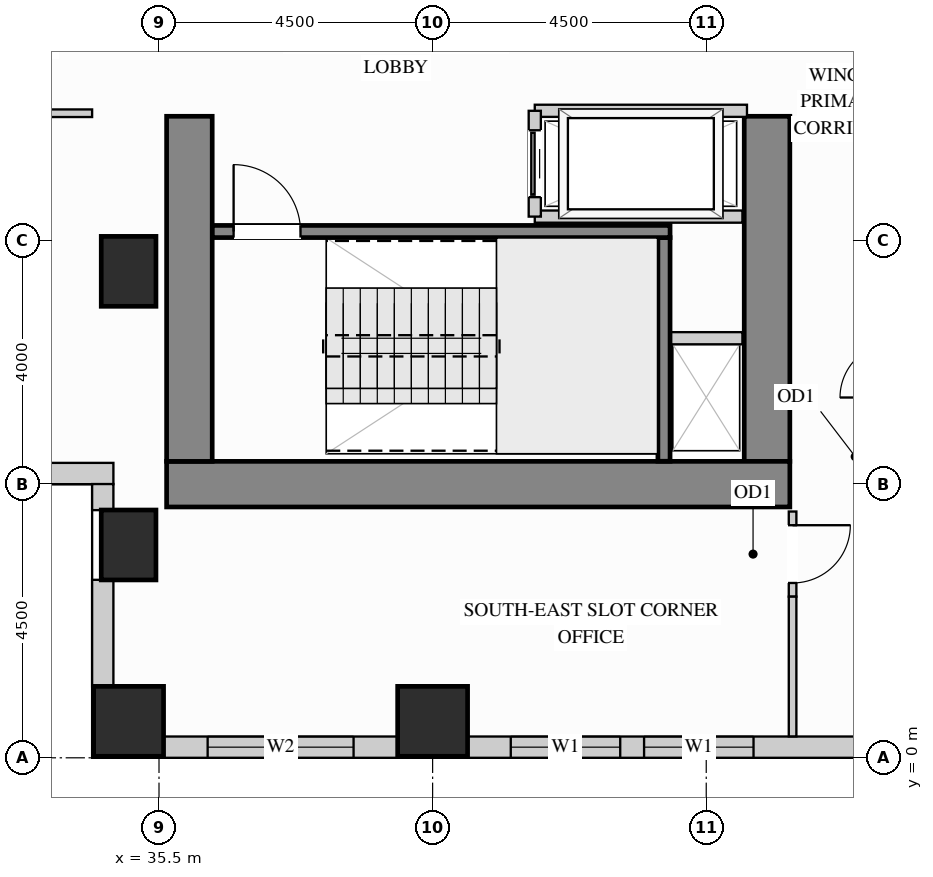
"""IFC4 building model, lengths in metres.
Left out: names, types, materials, properties, quantities, classifications, styles, units other than length and angle.
Written with IfcOpenShell. Run it as: python <this file> out.ifc"""

import sys

from ifc_helpers import new_model, si_unit, direction, frame, frame_2d, origin, origin_2d, place, context, subcontext, project, spatial, rectangle, extrude, source, transform, mapped, element, fill, save


model = new_model("IFC4")
c1 = context("Model", 3, precision=1e-05, world=origin(), true_north=direction((0.0, 1.0)))
c2 = subcontext(c1, "Body", "Model", "MODEL_VIEW")
j1 = project(units=[si_unit("LENGTHUNIT", "METRE"), si_unit("PLANEANGLEUNIT", "RADIAN")], contexts=[c1])
p1 = place(None, origin())
s1 = spatial("IfcSite", under=j1, at=p1, CompositionType="ELEMENT")
p2 = place(p1, origin())
s2 = spatial("IfcBuilding", under=s1, at=p2, CompositionType="ELEMENT")
p3 = place(p2, frame((0.0, 0.0, 77.4)))
s3 = spatial("IfcBuildingStorey", under=s2, at=p3, CompositionType="ELEMENT", Elevation=77.4)
m1 = source(origin(), c2, "Body", "SweptSolid", [
    extrude(rectangle(XDim=0.9, YDim=1.15, at=origin_2d()), origin(), (0.0, 0.0, 1.0), 3.38),
])
for number, where, z_axis, x_axis in (
    (1, (35.0, 3.5, 0.0), (0.0, 0.0, 1.0), (1.0, 0.0, 0.0)),
    (2, (35.0, 8.0, 0.0), (0.0, 0.0, 1.0), (1.0, 0.0, 0.0)),
):
    element("IfcColumn", number, at=place(p3, frame(where, z_axis=z_axis, x_axis=x_axis)), inside=s3, PredefinedType="COLUMN", context=c2, shape_type="MappedRepresentation", body=[
        mapped(m1, transform((0.0, 0.0, 0.0), x_axis=(1.0, 0.0, 0.0), y_axis=(0.0, 1.0, 0.0), z_axis=(0.0, 0.0, 1.0))),
    ])
m2 = source(origin(), c2, "Body", "SweptSolid", [
    extrude(rectangle(XDim=1.15, YDim=1.15, at=origin_2d()), origin(), (0.0, 0.0, 1.0), 3.38),
])
for number, where, z_axis, x_axis in (
    (3, (35.0, 0.6, 0.0), (0.0, 0.0, 1.0), (1.0, 0.0, 0.0)),
    (4, (40.0, 0.6, 0.0), (0.0, 0.0, 1.0), (1.0, 0.0, 0.0)),
):
    element("IfcColumn", number, at=place(p3, frame(where, z_axis=z_axis, x_axis=x_axis)), inside=s3, PredefinedType="COLUMN", context=c2, shape_type="MappedRepresentation", body=[
        mapped(m2, transform((0.0, 0.0, 0.0), x_axis=(1.0, 0.0, 0.0), y_axis=(0.0, 1.0, 0.0), z_axis=(0.0, 0.0, 1.0))),
    ])
m3 = source(origin(), c2, "Body", "SweptSolid", [
    extrude(rectangle(XDim=5.675, YDim=0.75, at=frame_2d((2.837, 0.0))), origin(), (0.0, 0.0, 1.0), 3.38),
])
p4 = place(p3, frame((45.5, 4.875, 0.0), z_axis=(0.0, 0.0, 1.0), x_axis=(0.0, 1.0, 0.0)))
e5 = element("IfcWall", 5, at=p4, inside=s3, PredefinedType="SHEAR", context=c2, shape_type="MappedRepresentation", body=[
    mapped(m3, transform((0.0, 0.0, 0.0), x_axis=(1.0, 0.0, 0.0), y_axis=(0.0, 1.0, 0.0), z_axis=(0.0, 0.0, 1.0))),
])
m4 = source(origin(), c2, "Body", "SweptSolid", [
    extrude(rectangle(XDim=10.25, YDim=0.75, at=frame_2d((5.125, 0.0))), origin(), (0.0, 0.0, 1.0), 3.38),
])
p5 = place(p3, frame((35.625, 4.5, 0.0), z_axis=(0.0, 0.0, 1.0), x_axis=(1.0, 0.0, 0.0)))
e6 = element("IfcWall", 6, at=p5, inside=s3, PredefinedType="SHEAR", context=c2, shape_type="MappedRepresentation", body=[
    mapped(m4, transform((0.0, 0.0, 0.0), x_axis=(1.0, 0.0, 0.0), y_axis=(0.0, 1.0, 0.0), z_axis=(0.0, 0.0, 1.0))),
])
p6 = place(p3, frame((36.0, 4.875, 0.0), z_axis=(0.0, 0.0, 1.0), x_axis=(0.0, 1.0, 0.0)))
e7 = element("IfcWall", 7, at=p6, inside=s3, PredefinedType="SHEAR", context=c2, shape_type="MappedRepresentation", body=[
    mapped(m3, transform((0.0, 0.0, 0.0), x_axis=(1.0, 0.0, 0.0), y_axis=(0.0, 1.0, 0.0), z_axis=(0.0, 0.0, 1.0))),
])
p7 = place(p3, frame((19.15, 4.675, 0.0), z_axis=(0.0, 0.0, 1.0), x_axis=(1.0, 0.0, 0.0)))
e8 = element("IfcWall", 8, at=p7, inside=s3, PredefinedType="SOLIDWALL", context=c2, shape_type="SweptSolid", body=[
    extrude(rectangle(XDim=15.6, YDim=0.35, at=frame_2d((7.8, 0.0))), origin(), (0.0, 0.0, 1.0), 3.365),
])
p8 = place(p7, frame((1.73, 0.0, 0.78)))
e9 = element("IfcOpeningElement", 9, at=p8, cuts=e8, PredefinedType="OPENING", context=c2, shape_type="SweptSolid", body=[
    extrude(rectangle(XDim=1.5, YDim=2.0, at=frame_2d((0.75, 1.0))), frame((0.0, 0.185, 0.0), z_axis=(0.0, -1.0, 0.0), x_axis=(1.0, 0.0, 0.0)), (0.0, 0.0, 1.0), 0.37),
])
p9 = place(p7, frame((4.64, 0.0, 0.78)))
e10 = element("IfcOpeningElement", 10, at=p9, cuts=e8, PredefinedType="OPENING", context=c2, shape_type="SweptSolid", body=[
    extrude(rectangle(XDim=1.5, YDim=2.0, at=frame_2d((0.75, 1.0))), frame((0.0, 0.185, 0.0), z_axis=(0.0, -1.0, 0.0), x_axis=(1.0, 0.0, 0.0)), (0.0, 0.0, 1.0), 0.37),
])
p10 = place(p7, frame((9.46, 0.0, 0.78)))
e11 = element("IfcOpeningElement", 11, at=p10, cuts=e8, PredefinedType="OPENING", context=c2, shape_type="SweptSolid", body=[
    extrude(rectangle(XDim=1.5, YDim=2.0, at=frame_2d((0.75, 1.0))), frame((0.0, 0.185, 0.0), z_axis=(0.0, -1.0, 0.0), x_axis=(1.0, 0.0, 0.0)), (0.0, 0.0, 1.0), 0.37),
])
p11 = place(p7, frame((12.37, 0.0, 0.78)))
e12 = element("IfcOpeningElement", 12, at=p11, cuts=e8, PredefinedType="OPENING", context=c2, shape_type="SweptSolid", body=[
    extrude(rectangle(XDim=1.5, YDim=2.0, at=frame_2d((0.75, 1.0))), frame((0.0, 0.185, 0.0), z_axis=(0.0, -1.0, 0.0), x_axis=(1.0, 0.0, 0.0)), (0.0, 0.0, 1.0), 0.37),
])
m5 = source(origin(), c2, "Body", "SweptSolid", [
    extrude(rectangle(XDim=0.429, YDim=0.35, at=frame_2d((0.214, 0.0))), origin(), (0.0, 0.0, 1.0), 3.365),
])
p12 = place(p3, frame((34.575, 4.502, 0.0), z_axis=(0.0, 0.0, 1.0), x_axis=(0.0, -1.0, 0.0)))
e13 = element("IfcWall", 13, at=p12, inside=s3, PredefinedType="SOLIDWALL", context=c2, shape_type="MappedRepresentation", body=[
    mapped(m5, transform((0.0, 0.0, 0.0), x_axis=(1.0, 0.0, 0.0), y_axis=(0.0, 1.0, 0.0), z_axis=(0.0, 0.0, 1.0))),
])
m6 = source(origin(), c2, "Body", "SweptSolid", [
    extrude(rectangle(XDim=1.754, YDim=0.35, at=frame_2d((0.877, 0.0))), origin(), (0.0, 0.0, 1.0), 3.365),
])
p13 = place(p3, frame((34.575, 2.927, 0.0), z_axis=(0.0, 0.0, 1.0), x_axis=(0.0, -1.0, 0.0)))
e14 = element("IfcWall", 14, at=p13, inside=s3, PredefinedType="SOLIDWALL", context=c2, shape_type="MappedRepresentation", body=[
    mapped(m6, transform((0.0, 0.0, 0.0), x_axis=(1.0, 0.0, 0.0), y_axis=(0.0, 1.0, 0.0), z_axis=(0.0, 0.0, 1.0))),
])
p14 = place(p3, frame((35.573, 0.175, 0.0), z_axis=(0.0, 0.0, 1.0), x_axis=(1.0, 0.0, 0.0)))
e15 = element("IfcWall", 15, at=p14, inside=s3, PredefinedType="SOLIDWALL", context=c2, shape_type="SweptSolid", body=[
    extrude(rectangle(XDim=3.854, YDim=0.35, at=frame_2d((1.927, 0.0))), origin(), (0.0, 0.0, 1.0), 3.365),
])
p15 = place(p14, frame((0.727, 0.0, 0.78)))
e16 = element("IfcOpeningElement", 16, at=p15, cuts=e15, PredefinedType="OPENING", context=c2, shape_type="SweptSolid", body=[
    extrude(rectangle(XDim=2.4, YDim=2.1, at=frame_2d((1.2, 1.05))), frame((0.0, 0.185, 0.0), z_axis=(0.0, -1.0, 0.0), x_axis=(1.0, 0.0, 0.0)), (0.0, 0.0, 1.0), 0.37),
])
p16 = place(p3, frame((40.573, 0.175, 0.0), z_axis=(0.0, 0.0, 1.0), x_axis=(1.0, 0.0, 0.0)))
e17 = element("IfcWall", 17, at=p16, inside=s3, PredefinedType="SOLIDWALL", context=c2, shape_type="SweptSolid", body=[
    extrude(rectangle(XDim=6.454, YDim=0.35, at=frame_2d((3.227, 0.0))), origin(), (0.0, 0.0, 1.0), 3.365),
])
p17 = place(p16, frame((0.712, 0.0, 0.78)))
e18 = element("IfcOpeningElement", 18, at=p17, cuts=e17, PredefinedType="OPENING", context=c2, shape_type="SweptSolid", body=[
    extrude(rectangle(XDim=1.8, YDim=2.1, at=frame_2d((0.9, 1.05))), frame((0.0, 0.185, 0.0), z_axis=(0.0, -1.0, 0.0), x_axis=(1.0, 0.0, 0.0)), (0.0, 0.0, 1.0), 0.37),
])
p18 = place(p16, frame((2.905, 0.0, 0.78)))
e19 = element("IfcOpeningElement", 19, at=p18, cuts=e17, PredefinedType="OPENING", context=c2, shape_type="SweptSolid", body=[
    extrude(rectangle(XDim=1.8, YDim=2.1, at=frame_2d((0.9, 1.05))), frame((0.0, 0.185, 0.0), z_axis=(0.0, -1.0, 0.0), x_axis=(1.0, 0.0, 0.0)), (0.0, 0.0, 1.0), 0.37),
])
p19 = place(p3, frame((45.92, 2.65, 0.0), z_axis=(0.0, 0.0, 1.0), x_axis=(0.0, 1.0, 0.0)))
e20 = element("IfcWall", 20, at=p19, inside=s3, PredefinedType="PARTITIONING", context=c2, shape_type="SweptSolid", body=[
    extrude(rectangle(XDim=1.4, YDim=0.125, at=frame_2d((0.7, 0.0))), origin(), (0.0, 0.0, 1.0), 3.365),
])
p20 = place(p19, frame((0.225, 0.0, 0.0)))
e21 = element("IfcOpeningElement", 21, at=p20, cuts=e20, PredefinedType="OPENING", context=c2, shape_type="SweptSolid", body=[
    extrude(rectangle(XDim=0.95, YDim=2.15, at=frame_2d((0.475, 1.075))), frame((0.0, 0.073, 0.0), z_axis=(0.0, -1.0, 0.0), x_axis=(1.0, 0.0, 0.0)), (0.0, 0.0, 1.0), 0.145),
])
m7 = source(origin(), c2, "Body", "SweptSolid", [
    extrude(rectangle(XDim=2.298, YDim=0.125, at=frame_2d((1.149, 0.0))), origin(), (0.0, 0.0, 1.0), 3.365),
])
p21 = place(p3, frame((45.92, 0.352, 0.0), z_axis=(0.0, 0.0, 1.0), x_axis=(0.0, 1.0, 0.0)))
e22 = element("IfcWall", 22, at=p21, inside=s3, PredefinedType="PARTITIONING", context=c2, shape_type="MappedRepresentation", body=[
    mapped(m7, transform((0.0, 0.0, 0.0), x_axis=(1.0, 0.0, 0.0), y_axis=(0.0, 1.0, 0.0), z_axis=(0.0, 0.0, 1.0))),
])
p22 = place(p3, frame((26.95, 10.6, 0.0), z_axis=(0.0, 0.0, 1.0), x_axis=(1.0, 0.0, 0.0)))
e23 = element("IfcWall", 23, at=p22, inside=s3, PredefinedType="PARTITIONING", context=c2, shape_type="SweptSolid", body=[
    extrude(rectangle(XDim=7.45, YDim=0.125, at=frame_2d((3.725, 0.0))), origin(), (0.0, 0.0, 1.0), 3.365),
])
p23 = place(p22, frame((4.683, 0.0, 0.0)))
e24 = element("IfcOpeningElement", 24, at=p23, cuts=e23, PredefinedType="OPENING", context=c2, shape_type="SweptSolid", body=[
    extrude(rectangle(XDim=0.95, YDim=2.15, at=frame_2d((0.475, 1.075))), frame((0.0, 0.073, 0.0), z_axis=(0.0, -1.0, 0.0), x_axis=(1.0, 0.0, 0.0)), (0.0, 0.0, 1.0), 0.145),
])
m8 = source(origin(), c2, "Body", "SweptSolid", [
    extrude(rectangle(XDim=1.245, YDim=0.2, at=frame_2d((0.623, 0.0))), origin(), (0.0, 0.0, 1.0), 3.365),
])
p24 = place(p3, frame((43.85, 6.9, 0.0), z_axis=(0.0, 0.0, 1.0), x_axis=(1.0, 0.0, 0.0)))
e25 = element("IfcWall", 25, at=p24, inside=s3, PredefinedType="PARTITIONING", context=c2, shape_type="MappedRepresentation", body=[
    mapped(m8, transform((0.0, 0.0, 0.0), x_axis=(1.0, 0.0, 0.0), y_axis=(0.0, 1.0, 0.0), z_axis=(0.0, 0.0, 1.0))),
])
m9 = source(origin(), c2, "Body", "SweptSolid", [
    extrude(rectangle(XDim=3.49, YDim=0.2, at=frame_2d((1.745, 0.0))), origin(), (0.0, 0.0, 1.0), 3.365),
])
p25 = place(p3, frame((41.68, 10.64, 0.0), z_axis=(0.0, 0.0, 1.0), x_axis=(1.0, 0.0, 0.0)))
e26 = element("IfcWall", 26, at=p25, inside=s3, PredefinedType="PARTITIONING", context=c2, shape_type="MappedRepresentation", body=[
    mapped(m9, transform((0.0, 0.0, 0.0), x_axis=(1.0, 0.0, 0.0), y_axis=(0.0, 1.0, 0.0), z_axis=(0.0, 0.0, 1.0))),
])
m10 = source(origin(), c2, "Body", "SweptSolid", [
    extrude(rectangle(XDim=3.415, YDim=0.2, at=frame_2d((1.708, 0.0))), origin(), (0.0, 0.0, 1.0), 3.365),
])
p26 = place(p3, frame((41.68, 8.9, 0.0), z_axis=(0.0, 0.0, 1.0), x_axis=(1.0, 0.0, 0.0)))
e27 = element("IfcWall", 27, at=p26, inside=s3, PredefinedType="PARTITIONING", context=c2, shape_type="MappedRepresentation", body=[
    mapped(m10, transform((0.0, 0.0, 0.0), x_axis=(1.0, 0.0, 0.0), y_axis=(0.0, 1.0, 0.0), z_axis=(0.0, 0.0, 1.0))),
])
p27 = place(p3, frame((41.68, 8.9, 0.0), z_axis=(0.0, 0.0, 1.0), x_axis=(0.0, 1.0, 0.0)))
e28 = element("IfcWall", 28, at=p27, inside=s3, PredefinedType="PARTITIONING", context=c2, shape_type="SweptSolid", body=[
    extrude(rectangle(XDim=1.74, YDim=0.2, at=frame_2d((0.87, 0.0))), origin(), (0.0, 0.0, 1.0), 3.365),
])
p28 = place(p27, frame((0.32, 0.0, 0.0)))
e29 = element("IfcOpeningElement", 29, at=p28, cuts=e28, PredefinedType="OPENING", context=c2, shape_type="SweptSolid", body=[
    extrude(rectangle(XDim=1.1, YDim=2.2, at=frame_2d((0.55, 1.1))), frame((0.0, 0.11, 0.0), z_axis=(0.0, -1.0, 0.0), x_axis=(1.0, 0.0, 0.0)), (0.0, 0.0, 1.0), 0.22),
])
m11 = source(origin(), c2, "Body", "SweptSolid", [
    extrude(rectangle(XDim=3.678, YDim=0.2, at=frame_2d((1.839, 0.0))), origin(), (0.0, 0.0, 1.0), 3.38),
])
p29 = place(p3, frame((43.805, 4.877, 0.0), z_axis=(0.0, 0.0, 1.0), x_axis=(0.0, 1.0, 0.0)))
e30 = element("IfcWall", 30, at=p29, inside=s3, PredefinedType="SHEAR", context=c2, shape_type="MappedRepresentation", body=[
    mapped(m11, transform((0.0, 0.0, 0.0), x_axis=(1.0, 0.0, 0.0), y_axis=(0.0, 1.0, 0.0), z_axis=(0.0, 0.0, 1.0))),
])
p30 = place(p3, frame((36.377, 8.655, 0.0), z_axis=(0.0, 0.0, 1.0), x_axis=(1.0, 0.0, 0.0)))
e31 = element("IfcWall", 31, at=p30, inside=s3, PredefinedType="SHEAR", context=c2, shape_type="SweptSolid", body=[
    extrude(rectangle(XDim=7.528, YDim=0.2, at=frame_2d((3.764, 0.0))), origin(), (0.0, 0.0, 1.0), 3.38),
])
p31 = place(p30, frame((0.35, 0.0, 0.0)))
e32 = element("IfcOpeningElement", 32, at=p31, cuts=e31, PredefinedType="OPENING", context=c2, shape_type="SweptSolid", body=[
    extrude(rectangle(XDim=1.1, YDim=2.15, at=frame_2d((0.55, 1.075))), frame((0.0, 0.11, 0.0), z_axis=(0.0, -1.0, 0.0), x_axis=(1.0, 0.0, 0.0)), (0.0, 0.0, 1.0), 0.22),
])
m12 = source(origin(), c2, "Body", "SweptSolid", [
    extrude(rectangle(XDim=1.1, YDim=2.2, at=frame_2d((0.55, 1.1))), frame((0.0, 0.025, 0.0), z_axis=(0.0, -1.0, 0.0), x_axis=(1.0, 0.0, 0.0)), (0.0, 0.0, 1.0), 0.05),
])
p32 = place(p28, origin())
e33 = element("IfcDoor", 33, at=p32, inside=s3, OperationType="SLIDING_TO_LEFT", PredefinedType="DOOR", context=c2, shape_type="MappedRepresentation", body=[
    mapped(m12, transform((0.0, 0.0, 0.0), x_axis=(1.0, 0.0, 0.0), y_axis=(0.0, 1.0, 0.0), z_axis=(0.0, 0.0, 1.0))),
])
fill(e29, e33)
m13 = source(origin(), c2, "Body", "SweptSolid", [
    extrude(rectangle(XDim=0.95, YDim=2.15, at=frame_2d((0.475, 1.075))), frame((0.0, 0.025, 0.0), z_axis=(0.0, -1.0, 0.0), x_axis=(1.0, 0.0, 0.0)), (0.0, 0.0, 1.0), 0.05),
])
p33 = place(p20, origin())
e34 = element("IfcDoor", 34, at=p33, inside=s3, OperationType="SINGLE_SWING_RIGHT", PredefinedType="DOOR", context=c2, shape_type="MappedRepresentation", body=[
    mapped(m13, transform((0.0, 0.0, 0.0), x_axis=(1.0, 0.0, 0.0), y_axis=(0.0, 1.0, 0.0), z_axis=(0.0, 0.0, 1.0))),
])
fill(e21, e34)
m14 = source(origin(), c2, "Body", "SweptSolid", [
    extrude(rectangle(XDim=1.1, YDim=2.15, at=frame_2d((0.55, 1.075))), frame((0.0, 0.025, 0.0), z_axis=(0.0, -1.0, 0.0), x_axis=(1.0, 0.0, 0.0)), (0.0, 0.0, 1.0), 0.05),
])
p34 = place(p31, origin())
e35 = element("IfcDoor", 35, at=p34, inside=s3, OperationType="SINGLE_SWING_LEFT", PredefinedType="DOOR", context=c2, shape_type="MappedRepresentation", body=[
    mapped(m14, transform((0.0, 0.0, 0.0), x_axis=(1.0, 0.0, 0.0), y_axis=(0.0, 1.0, 0.0), z_axis=(0.0, 0.0, 1.0))),
])
fill(e32, e35)
m15 = source(origin(), c2, "Body", "SweptSolid", [
    extrude(rectangle(XDim=1.8, YDim=2.1, at=frame_2d((0.9, 1.05))), frame((0.0, 0.03, 0.0), z_axis=(0.0, -1.0, 0.0), x_axis=(1.0, 0.0, 0.0)), (0.0, 0.0, 1.0), 0.06),
])
p35 = place(p17, origin())
e36 = element("IfcWindow", 36, at=p35, inside=s3, PartitioningType="SINGLE_PANEL", PredefinedType="WINDOW", context=c2, shape_type="MappedRepresentation", body=[
    mapped(m15, transform((0.0, 0.0, 0.0), x_axis=(1.0, 0.0, 0.0), y_axis=(0.0, 1.0, 0.0), z_axis=(0.0, 0.0, 1.0))),
])
fill(e18, e36)
p36 = place(p18, origin())
e37 = element("IfcWindow", 37, at=p36, inside=s3, PartitioningType="SINGLE_PANEL", PredefinedType="WINDOW", context=c2, shape_type="MappedRepresentation", body=[
    mapped(m15, transform((0.0, 0.0, 0.0), x_axis=(1.0, 0.0, 0.0), y_axis=(0.0, 1.0, 0.0), z_axis=(0.0, 0.0, 1.0))),
])
fill(e19, e37)
m16 = source(origin(), c2, "Body", "SweptSolid", [
    extrude(rectangle(XDim=2.4, YDim=2.1, at=frame_2d((1.2, 1.05))), frame((0.0, 0.03, 0.0), z_axis=(0.0, -1.0, 0.0), x_axis=(1.0, 0.0, 0.0)), (0.0, 0.0, 1.0), 0.06),
])
p37 = place(p15, origin())
e38 = element("IfcWindow", 38, at=p37, inside=s3, PartitioningType="SINGLE_PANEL", PredefinedType="WINDOW", context=c2, shape_type="MappedRepresentation", body=[
    mapped(m16, transform((0.0, 0.0, 0.0), x_axis=(1.0, 0.0, 0.0), y_axis=(0.0, 1.0, 0.0), z_axis=(0.0, 0.0, 1.0))),
])
fill(e16, e38)
save(model, sys.argv[1])
